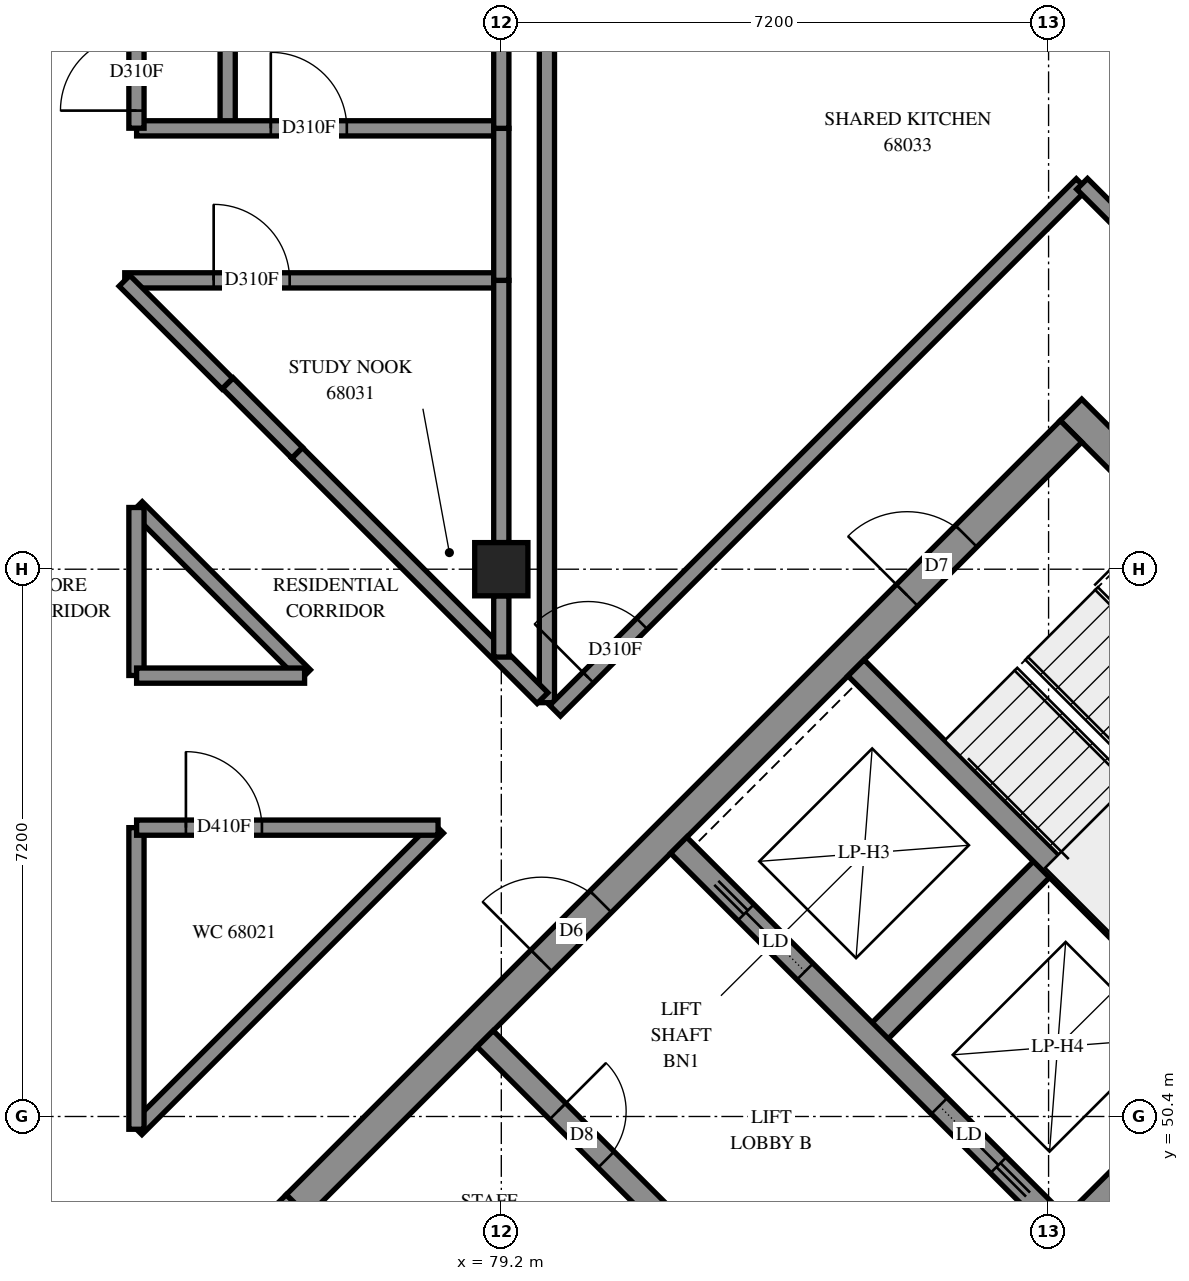
"""IFC4 building model, lengths in metres.
Left out: names, types, materials, properties, quantities, classifications, styles, units other than length and angle.
Written with IfcOpenShell. Run it as: python <this file> out.ifc"""

import sys

from ifc_helpers import new_model, si_unit, direction, frame, frame_2d, origin, origin_2d, place, context, subcontext, project, spatial, polyline, rectangle, outline, extrude, element, fill, save


model = new_model("IFC4")
c1 = context("Model", 3, precision=1e-05, world=origin(), true_north=direction((0.0, 1.0)))
c2 = subcontext(c1, "Body", "Model", "MODEL_VIEW")
j1 = project(units=[si_unit("LENGTHUNIT", "METRE"), si_unit("PLANEANGLEUNIT", "RADIAN")], contexts=[c1])
p1 = place(None, origin())
s1 = spatial("IfcSite", under=j1, at=p1, CompositionType="ELEMENT")
p2 = place(p1, origin())
s2 = spatial("IfcBuilding", under=s1, at=p2, CompositionType="ELEMENT")
p3 = place(p2, frame((0.0, 0.0, 250.6)))
s3 = spatial("IfcBuildingStorey", under=s2, at=p3, CompositionType="ELEMENT", Elevation=250.6)
p4 = place(p3, frame((79.2, 57.6, 0.0), z_axis=(0.0, 0.0, 1.0), x_axis=(1.0, 0.0, 0.0)))
e1 = element("IfcColumn", 1, at=p4, inside=s3, PredefinedType="COLUMN", context=c2, shape_type="SweptSolid", body=[
    extrude(rectangle(XDim=0.7, YDim=0.7, at=origin_2d()), origin(), (0.0, 0.0, 1.0), 3.1),
])
p5 = place(p3, frame((76.23, 49.231, -0.3), z_axis=(0.0, 0.0, 1.0), x_axis=(0.7071034917, -0.7071100706, 0.0)))
e2 = element("IfcWall", 2, at=p5, inside=s3, PredefinedType="SHEAR", context=c2, shape_type="SweptSolid", body=[
    extrude(rectangle(XDim=15.2, YDim=0.4, at=frame_2d((7.6, 0.0))), origin(), (0.0, 0.0, 1.0), 2.7),
])
p6 = place(p3, frame((86.695, 59.696, -0.3), z_axis=(0.0, 0.0, 1.0), x_axis=(0.7071100706, -0.7071034917, 0.0)))
e3 = element("IfcWall", 3, at=p6, inside=s3, PredefinedType="SHEAR", context=c2, shape_type="SweptSolid", body=[
    extrude(rectangle(XDim=15.2, YDim=0.4, at=frame_2d((7.6, 0.0))), origin(), (0.0, 0.0, 1.0), 2.7),
])
p7 = place(p6, frame((10.4, 0.0, 0.3)))
e4 = element("IfcOpeningElement", 4, at=p7, cuts=e3, PredefinedType="OPENING", context=c2, shape_type="SweptSolid", body=[
    extrude(rectangle(XDim=0.8, YDim=2.1, at=frame_2d((0.4, 1.05))), frame((0.0, 0.21, 0.0), z_axis=(0.0, -1.0, 0.0), x_axis=(1.0, 0.0, 0.0)), (0.0, 0.0, 1.0), 0.42),
])
p8 = place(p3, frame((76.513, 49.231, -0.3), z_axis=(0.0, 0.0, 1.0), x_axis=(0.7071067812, 0.7071067812, 0.0)))
e5 = element("IfcWall", 5, at=p8, inside=s3, PredefinedType="SHEAR", context=c2, shape_type="SweptSolid", body=[
    extrude(rectangle(XDim=14.4, YDim=0.4, at=frame_2d((7.2, 0.0))), origin(), (0.0, 0.0, 1.0), 2.7),
])
p9 = place(p8, frame((4.55, 0.0, 0.3)))
e6 = element("IfcOpeningElement", 6, at=p9, cuts=e5, PredefinedType="OPENING", context=c2, shape_type="SweptSolid", body=[
    extrude(rectangle(XDim=1.1, YDim=2.1, at=frame_2d((0.55, 1.05))), frame((0.0, 0.21, 0.0), z_axis=(0.0, -1.0, 0.0), x_axis=(1.0, 0.0, 0.0)), (0.0, 0.0, 1.0), 0.42),
])
p10 = place(p8, frame((11.35, 0.0, 0.3)))
e7 = element("IfcOpeningElement", 7, at=p10, cuts=e5, PredefinedType="OPENING", context=c2, shape_type="SweptSolid", body=[
    extrude(rectangle(XDim=1.1, YDim=2.1, at=frame_2d((0.55, 1.05))), frame((0.0, 0.21, 0.0), z_axis=(0.0, -1.0, 0.0), x_axis=(1.0, 0.0, 0.0)), (0.0, 0.0, 1.0), 0.42),
])
p11 = place(p3, frame((84.079, 51.423, 0.0), z_axis=(0.0, 0.0, 1.0), x_axis=(0.7071219326, 0.7070916295, 0.0)))
e8 = element("IfcWall", 8, at=p11, inside=s3, PredefinedType="SOLIDWALL", context=c2, shape_type="SweptSolid", body=[
    extrude(rectangle(XDim=3.3, YDim=0.3, at=frame_2d((1.65, 0.0))), origin(), (0.0, 0.0, 1.0), 3.1),
])
p12 = place(p3, frame((86.625, 48.878, 0.0), z_axis=(0.0, 0.0, 1.0), x_axis=(0.7071067812, 0.7071067812, 0.0)))
e9 = element("IfcWall", 9, at=p12, inside=s3, PredefinedType="SOLIDWALL", context=c2, shape_type="SweptSolid", body=[
    extrude(rectangle(XDim=3.3, YDim=0.3, at=frame_2d((1.65, 0.0))), origin(), (0.0, 0.0, 1.0), 3.1),
])
p13 = place(p3, frame((78.988, 51.423, 0.0), z_axis=(0.0, 0.0, 1.0), x_axis=(0.7071067812, -0.7071067812, 0.0)))
e10 = element("IfcWall", 10, at=p13, inside=s3, PredefinedType="SOLIDWALL", context=c2, shape_type="SweptSolid", body=[
    extrude(rectangle(XDim=14.4, YDim=0.3, at=frame_2d((7.2, 0.0))), origin(), (0.0, 0.0, 1.0), 3.1),
])
p14 = place(p13, frame((1.35, 0.0, 0.0)))
e11 = element("IfcOpeningElement", 11, at=p14, cuts=e10, PredefinedType="OPENING", context=c2, shape_type="SweptSolid", body=[
    extrude(rectangle(XDim=0.9, YDim=2.1, at=frame_2d((0.45, 1.05))), frame((0.0, 0.16, 0.0), z_axis=(0.0, -1.0, 0.0), x_axis=(1.0, 0.0, 0.0)), (0.0, 0.0, 1.0), 0.32),
])
p15 = place(p13, frame((4.95, 0.0, 0.0)))
e12 = element("IfcOpeningElement", 12, at=p15, cuts=e10, PredefinedType="OPENING", context=c2, shape_type="SweptSolid", body=[
    extrude(rectangle(XDim=0.9, YDim=2.1, at=frame_2d((0.45, 1.05))), frame((0.0, 0.16, 0.0), z_axis=(0.0, -1.0, 0.0), x_axis=(1.0, 0.0, 0.0)), (0.0, 0.0, 1.0), 0.32),
])
p16 = place(p13, frame((8.55, 0.0, 0.0)))
e13 = element("IfcOpeningElement", 13, at=p16, cuts=e10, PredefinedType="OPENING", context=c2, shape_type="SweptSolid", body=[
    extrude(rectangle(XDim=0.9, YDim=2.1, at=frame_2d((0.45, 1.05))), frame((0.0, 0.16, 0.0), z_axis=(0.0, -1.0, 0.0), x_axis=(1.0, 0.0, 0.0)), (0.0, 0.0, 1.0), 0.32),
])
p17 = place(p13, frame((12.05, 0.0, 0.0)))
e14 = element("IfcOpeningElement", 14, at=p17, cuts=e10, PredefinedType="OPENING", context=c2, shape_type="SweptSolid", body=[
    extrude(rectangle(XDim=1.1, YDim=2.1, at=frame_2d((0.55, 1.05))), frame((0.0, 0.16, 0.0), z_axis=(0.0, -1.0, 0.0), x_axis=(1.0, 0.0, 0.0)), (0.0, 0.0, 1.0), 0.32),
])
p18 = place(p3, frame((81.534, 53.969, 0.0), z_axis=(0.0, 0.0, 1.0), x_axis=(0.707103309, -0.7071102534, 0.0)))
e15 = element("IfcWall", 15, at=p18, inside=s3, PredefinedType="SOLIDWALL", context=c2, shape_type="SweptSolid", body=[
    extrude(rectangle(XDim=14.4, YDim=0.3, at=frame_2d((7.2, 0.0))), origin(), (0.0, 0.0, 1.0), 3.1),
])
p19 = place(p18, frame((8.55, 0.0, 0.0)))
e16 = element("IfcOpeningElement", 16, at=p19, cuts=e15, PredefinedType="OPENING", context=c2, shape_type="SweptSolid", body=[
    extrude(rectangle(XDim=0.9, YDim=2.1, at=frame_2d((0.45, 1.05))), frame((0.0, 0.16, 0.0), z_axis=(0.0, -1.0, 0.0), x_axis=(1.0, 0.0, 0.0)), (0.0, 0.0, 1.0), 0.32),
])
p20 = place(p18, frame((1.25, 0.0, 0.0)))
e17 = element("IfcOpeningElement", 17, at=p20, cuts=e15, PredefinedType="OPENING", context=c2, shape_type="SweptSolid", body=[
    extrude(rectangle(XDim=1.1, YDim=2.1, at=frame_2d((0.55, 1.05))), frame((0.0, 0.16, 0.0), z_axis=(0.0, -1.0, 0.0), x_axis=(1.0, 0.0, 0.0)), (0.0, 0.0, 1.0), 0.32),
])
p21 = place(p18, frame((4.85, 0.0, 0.0)))
e18 = element("IfcOpeningElement", 18, at=p21, cuts=e15, PredefinedType="OPENING", context=c2, shape_type="SweptSolid", body=[
    extrude(rectangle(XDim=1.1, YDim=2.1, at=frame_2d((0.55, 1.05))), frame((0.0, 0.16, 0.0), z_axis=(0.0, -1.0, 0.0), x_axis=(1.0, 0.0, 0.0)), (0.0, 0.0, 1.0), 0.32),
])
p22 = place(p18, frame((12.05, 0.0, 0.0)))
e19 = element("IfcOpeningElement", 19, at=p22, cuts=e15, PredefinedType="OPENING", context=c2, shape_type="SweptSolid", body=[
    extrude(rectangle(XDim=1.1, YDim=2.1, at=frame_2d((0.55, 1.05))), frame((0.0, 0.16, 0.0), z_axis=(0.0, -1.0, 0.0), x_axis=(1.0, 0.0, 0.0)), (0.0, 0.0, 1.0), 0.32),
])
p23 = place(p3, frame((83.867, 56.302, 0.0), z_axis=(0.0, 0.0, 1.0), x_axis=(0.7071137256, -0.7070998367, 0.0)))
e20 = element("IfcWall", 20, at=p23, inside=s3, PredefinedType="SOLIDWALL", context=c2, shape_type="SweptSolid", body=[
    extrude(rectangle(XDim=7.2, YDim=0.3, at=frame_2d((3.6, 0.0))), origin(), (0.0, 0.0, 1.0), 3.1),
])
p24 = place(p3, frame((88.928, 64.159, 0.0), z_axis=(0.0, 0.0, 1.0), x_axis=(-0.7792026718, 0.6267720449, 0.0)))
e21 = element("IfcWall", 21, at=p24, inside=s3, PredefinedType="SOLIDWALL", context=c2, shape_type="SweptSolid", body=[
    extrude(outline(polyline([(-0.024, -0.225), (3.325, -0.225), (3.373, 0.225), (0.024, 0.225), (-0.024, -0.225)])), origin(), (0.0, 0.0, 1.0), 3.1),
])
p25 = place(p24, frame((0.328, 0.0, 0.45)))
e22 = element("IfcOpeningElement", 22, at=p25, cuts=e21, PredefinedType="OPENING", context=c2, shape_type="SweptSolid", body=[
    extrude(rectangle(XDim=1.2, YDim=2.55, at=frame_2d((0.6, 1.275))), frame((0.0, 0.235, 0.0), z_axis=(0.0, -1.0, 0.0), x_axis=(1.0, 0.0, 0.0)), (0.0, 0.0, 1.0), 0.47),
])
p26 = place(p24, frame((1.791, 0.0, 0.45)))
e23 = element("IfcOpeningElement", 23, at=p26, cuts=e21, PredefinedType="OPENING", context=c2, shape_type="SweptSolid", body=[
    extrude(rectangle(XDim=1.2, YDim=2.55, at=frame_2d((0.6, 1.275))), frame((0.0, 0.235, 0.0), z_axis=(0.0, -1.0, 0.0), x_axis=(1.0, 0.0, 0.0)), (0.0, 0.0, 1.0), 0.47),
])
p27 = place(p3, frame((79.8, 55.844, 0.0), z_axis=(0.0, 0.0, 1.0), x_axis=(0.0, 1.0, 0.0)))
e24 = element("IfcWall", 24, at=p27, inside=s3, PredefinedType="PARTITIONING", context=c2, shape_type="SweptSolid", body=[
    extrude(rectangle(XDim=11.664, YDim=0.2, at=frame_2d((5.832, 0.0))), origin(), (0.0, 0.0, 1.0), 3.1),
])
p28 = place(p3, frame((79.907, 55.739, 0.0), z_axis=(0.0, 0.0, 1.0), x_axis=(0.7071067812, 0.7071067812, 0.0)))
e25 = element("IfcWall", 25, at=p28, inside=s3, PredefinedType="PARTITIONING", context=c2, shape_type="SweptSolid", body=[
    extrude(rectangle(XDim=9.798, YDim=0.2, at=frame_2d((4.899, 0.0))), origin(), (0.0, 0.0, 1.0), 3.1),
])
p29 = place(p28, frame((0.617, 0.0, 0.0)))
e26 = element("IfcOpeningElement", 26, at=p29, cuts=e25, PredefinedType="OPENING", context=c2, shape_type="SweptSolid", body=[
    extrude(rectangle(XDim=1.0, YDim=2.1, at=frame_2d((0.5, 1.05))), frame((0.0, 0.11, 0.0), z_axis=(0.0, -1.0, 0.0), x_axis=(1.0, 0.0, 0.0)), (0.0, 0.0, 1.0), 0.22),
])
p30 = place(p3, frame((75.6, 63.4, 0.0), z_axis=(0.0, 0.0, 1.0), x_axis=(0.0, 1.0, 0.0)))
e27 = element("IfcWall", 27, at=p30, inside=s3, PredefinedType="PARTITIONING", context=c2, shape_type="SweptSolid", body=[
    extrude(rectangle(XDim=9.412, YDim=0.2, at=frame_2d((4.706, 0.0))), origin(), (0.0, 0.0, 1.0), 3.1),
])
p31 = place(p3, frame((74.401, 50.233, 0.0), z_axis=(0.0, 0.0, 1.0), x_axis=(0.7071067812, 0.7071067812, 0.0)))
e28 = element("IfcWall", 28, at=p31, inside=s3, PredefinedType="PARTITIONING", context=c2, shape_type="SweptSolid", body=[
    extrude(rectangle(XDim=5.609, YDim=0.2, at=frame_2d((2.804, 0.0))), origin(), (0.0, 0.0, 1.0), 3.1),
])
p32 = place(p3, frame((74.246, 61.4, 0.0), z_axis=(0.0, 0.0, 1.0), x_axis=(1.0, 0.0, 0.0)))
e29 = element("IfcWall", 29, at=p32, inside=s3, PredefinedType="PARTITIONING", context=c2, shape_type="SweptSolid", body=[
    extrude(rectangle(XDim=4.954, YDim=0.2, at=frame_2d((2.477, 0.0))), origin(), (0.0, 0.0, 1.0), 3.1),
])
p33 = place(p32, frame((1.17, 0.0, 0.0)))
e30 = element("IfcOpeningElement", 30, at=p33, cuts=e29, PredefinedType="OPENING", context=c2, shape_type="SweptSolid", body=[
    extrude(rectangle(XDim=1.0, YDim=2.1, at=frame_2d((0.5, 1.05))), frame((0.0, 0.11, 0.0), z_axis=(0.0, -1.0, 0.0), x_axis=(1.0, 0.0, 0.0)), (0.0, 0.0, 1.0), 0.22),
])
p34 = place(p3, frame((74.402, 63.4, 0.0), z_axis=(0.0, 0.0, 1.0), x_axis=(1.0, 0.0, 0.0)))
e31 = element("IfcWall", 31, at=p34, inside=s3, PredefinedType="PARTITIONING", context=c2, shape_type="SweptSolid", body=[
    extrude(rectangle(XDim=4.798, YDim=0.2, at=frame_2d((2.399, 0.0))), origin(), (0.0, 0.0, 1.0), 3.1),
])
p35 = place(p34, frame((1.766, 0.0, 0.0)))
e32 = element("IfcOpeningElement", 32, at=p35, cuts=e31, PredefinedType="OPENING", context=c2, shape_type="SweptSolid", body=[
    extrude(rectangle(XDim=1.0, YDim=2.1, at=frame_2d((0.5, 1.05))), frame((0.0, 0.11, 0.0), z_axis=(0.0, -1.0, 0.0), x_axis=(1.0, 0.0, 0.0)), (0.0, 0.0, 1.0), 0.22),
])
p36 = place(p3, frame((76.513, 59.131, 0.0), z_axis=(0.0, 0.0, 1.0), x_axis=(0.7073586681, -0.7068548045, 0.0)))
e33 = element("IfcWall", 33, at=p36, inside=s3, PredefinedType="PARTITIONING", context=c2, shape_type="SweptSolid", body=[
    extrude(rectangle(XDim=4.565, YDim=0.2, at=frame_2d((2.282, 0.0))), origin(), (0.0, 0.0, 1.0), 3.1),
])
p37 = place(p3, frame((74.4, 50.232, 0.0), z_axis=(0.0, 0.0, 1.0), x_axis=(0.0, 1.0, 0.0)))
e34 = element("IfcWall", 34, at=p37, inside=s3, PredefinedType="PARTITIONING", context=c2, shape_type="SweptSolid", body=[
    extrude(rectangle(XDim=3.968, YDim=0.2, at=frame_2d((1.984, 0.0))), origin(), (0.0, 0.0, 1.0), 3.1),
])
p38 = place(p3, frame((74.402, 54.2, 0.0), z_axis=(0.0, 0.0, 1.0), x_axis=(1.0, 0.0, 0.0)))
e35 = element("IfcWall", 35, at=p38, inside=s3, PredefinedType="PARTITIONING", context=c2, shape_type="SweptSolid", body=[
    extrude(rectangle(XDim=3.966, YDim=0.2, at=frame_2d((1.983, 0.0))), origin(), (0.0, 0.0, 1.0), 3.1),
])
p39 = place(p38, frame((0.649, 0.0, 0.0)))
e36 = element("IfcOpeningElement", 36, at=p39, cuts=e35, PredefinedType="OPENING", context=c2, shape_type="SweptSolid", body=[
    extrude(rectangle(XDim=1.0, YDim=2.1, at=frame_2d((0.5, 1.05))), frame((0.0, 0.11, 0.0), z_axis=(0.0, -1.0, 0.0), x_axis=(1.0, 0.0, 0.0)), (0.0, 0.0, 1.0), 0.22),
])
p40 = place(p3, frame((74.4, 63.402, 0.0), z_axis=(0.0, 0.0, 1.0), x_axis=(0.0, 1.0, 0.0)))
e37 = element("IfcWall", 37, at=p40, inside=s3, PredefinedType="PARTITIONING", context=c2, shape_type="SweptSolid", body=[
    extrude(rectangle(XDim=3.798, YDim=0.2, at=frame_2d((1.899, 0.0))), origin(), (0.0, 0.0, 1.0), 3.1),
])
p41 = place(p40, frame((0.231, 0.0, 0.0)))
e38 = element("IfcOpeningElement", 38, at=p41, cuts=e37, PredefinedType="OPENING", context=c2, shape_type="SweptSolid", body=[
    extrude(rectangle(XDim=1.0, YDim=2.1, at=frame_2d((0.5, 1.05))), frame((0.0, 0.11, 0.0), z_axis=(0.0, -1.0, 0.0), x_axis=(1.0, 0.0, 0.0)), (0.0, 0.0, 1.0), 0.22),
])
p42 = place(p3, frame((79.2, 57.95, 0.0), z_axis=(0.0, 0.0, 1.0), x_axis=(0.0, 1.0, 0.0)))
e39 = element("IfcWall", 39, at=p42, inside=s3, PredefinedType="PARTITIONING", context=c2, shape_type="SweptSolid", body=[
    extrude(rectangle(XDim=3.45, YDim=0.2, at=frame_2d((1.725, 0.0))), origin(), (0.0, 0.0, 1.0), 3.1),
])
p43 = place(p3, frame((74.406, 58.417, 0.0), z_axis=(0.0, 0.0, 1.0), x_axis=(0.7071067812, -0.7071067812, 0.0)))
e40 = element("IfcWall", 40, at=p43, inside=s3, PredefinedType="PARTITIONING", context=c2, shape_type="SweptSolid", body=[
    extrude(rectangle(XDim=3.128, YDim=0.2, at=frame_2d((1.564, 0.0))), origin(), (0.0, 0.0, 1.0), 3.1),
])
p44 = place(p3, frame((86.841, 62.669, 0.0), z_axis=(0.0, 0.0, 1.0), x_axis=(0.7071067812, -0.7071067812, 0.0)))
e41 = element("IfcWall", 41, at=p44, inside=s3, PredefinedType="PARTITIONING", context=c2, shape_type="SweptSolid", body=[
    extrude(rectangle(XDim=2.398, YDim=0.2, at=frame_2d((1.199, 0.0))), origin(), (0.0, 0.0, 1.0), 3.1),
])
for number, where, z_axis, x_axis in (
    (42, (74.4, 56.202, 0.0), (0.0, 0.0, 1.0), (0.0, 1.0, 0.0)),
    (43, (74.402, 56.2, 0.0), (0.0, 0.0, 1.0), (1.0, 0.0, 0.0)),
):
    element("IfcWall", number, at=place(p3, frame(where, z_axis=z_axis, x_axis=x_axis)), inside=s3, PredefinedType="PARTITIONING", context=c2, shape_type="SweptSolid", body=[
        extrude(rectangle(XDim=2.21, YDim=0.2, at=frame_2d((1.105, 0.0))), origin(), (0.0, 0.0, 1.0), 3.1),
    ])
p45 = place(p3, frame((79.2, 61.4, 0.0), z_axis=(0.0, 0.0, 1.0), x_axis=(0.0, 1.0, 0.0)))
e44 = element("IfcWall", 44, at=p45, inside=s3, PredefinedType="PARTITIONING", context=c2, shape_type="SweptSolid", body=[
    extrude(rectangle(XDim=2.0, YDim=0.2, at=frame_2d((1.0, 0.0))), origin(), (0.0, 0.0, 1.0), 3.1),
])
p46 = place(p3, frame((74.243, 61.395, 0.0), z_axis=(0.0, 0.0, 1.0), x_axis=(0.7071067812, -0.7071067812, 0.0)))
e45 = element("IfcWall", 45, at=p46, inside=s3, PredefinedType="PARTITIONING", context=c2, shape_type="SweptSolid", body=[
    extrude(rectangle(XDim=1.915, YDim=0.2, at=frame_2d((0.957, 0.0))), origin(), (0.0, 0.0, 1.0), 3.1),
])
p47 = place(p3, frame((75.602, 60.046, 0.0), z_axis=(0.0, 0.0, 1.0), x_axis=(0.7063318703, -0.7078808437, 0.0)))
e46 = element("IfcWall", 46, at=p47, inside=s3, PredefinedType="PARTITIONING", context=c2, shape_type="SweptSolid", body=[
    extrude(rectangle(XDim=1.291, YDim=0.2, at=frame_2d((0.646, 0.0))), origin(), (0.0, 0.0, 1.0), 3.1),
])
p48 = place(p3, frame((79.2, 63.4, 0.0), z_axis=(0.0, 0.0, 1.0), x_axis=(0.0, 1.0, 0.0)))
e47 = element("IfcWall", 47, at=p48, inside=s3, PredefinedType="PARTITIONING", context=c2, shape_type="SweptSolid", body=[
    extrude(rectangle(XDim=1.05, YDim=0.2, at=frame_2d((0.525, 0.0))), origin(), (0.0, 0.0, 1.0), 3.1),
])
p49 = place(p3, frame((79.2, 56.444, 0.0), z_axis=(0.0, 0.0, 1.0), x_axis=(0.0, 1.0, 0.0)))
e48 = element("IfcWall", 48, at=p49, inside=s3, PredefinedType="PARTITIONING", context=c2, shape_type="SweptSolid", body=[
    extrude(rectangle(XDim=0.806, YDim=0.2, at=frame_2d((0.403, 0.0))), origin(), (0.0, 0.0, 1.0), 3.1),
])
p50 = place(p9, origin())
e49 = element("IfcDoor", 49, at=p50, inside=s3, OperationType="DOUBLE_DOOR_SINGLE_SWING", PredefinedType="DOOR", context=c2, shape_type="SweptSolid", body=[
    extrude(rectangle(XDim=1.1, YDim=2.1, at=frame_2d((0.55, 1.05))), frame((0.0, 0.025, 0.0), z_axis=(0.0, -1.0, 0.0), x_axis=(1.0, 0.0, 0.0)), (0.0, 0.0, 1.0), 0.05),
])
fill(e6, e49)
p51 = place(p10, origin())
e50 = element("IfcDoor", 50, at=p51, inside=s3, OperationType="SINGLE_SWING_LEFT", PredefinedType="DOOR", context=c2, shape_type="SweptSolid", body=[
    extrude(rectangle(XDim=1.1, YDim=2.1, at=frame_2d((0.55, 1.05))), frame((0.0, 0.025, 0.0), z_axis=(0.0, -1.0, 0.0), x_axis=(1.0, 0.0, 0.0)), (0.0, 0.0, 1.0), 0.05),
])
fill(e7, e50)
p52 = place(p14, origin())
e51 = element("IfcDoor", 51, at=p52, inside=s3, OperationType="SINGLE_SWING_LEFT", PredefinedType="DOOR", context=c2, shape_type="SweptSolid", body=[
    extrude(rectangle(XDim=0.9, YDim=2.1, at=frame_2d((0.45, 1.05))), frame((0.0, 0.025, 0.0), z_axis=(0.0, -1.0, 0.0), x_axis=(1.0, 0.0, 0.0)), (0.0, 0.0, 1.0), 0.05),
])
fill(e11, e51)
p53 = place(p20, origin())
e52 = element("IfcDoor", 52, at=p53, inside=s3, OperationType="SLIDING_TO_LEFT", PredefinedType="DOOR", context=c2, shape_type="SweptSolid", body=[
    extrude(rectangle(XDim=1.1, YDim=2.1, at=frame_2d((0.55, 1.05))), frame((0.0, 0.025, 0.0), z_axis=(0.0, -1.0, 0.0), x_axis=(1.0, 0.0, 0.0)), (0.0, 0.0, 1.0), 0.05),
])
fill(e17, e52)
p54 = place(p21, origin())
e53 = element("IfcDoor", 53, at=p54, inside=s3, OperationType="SLIDING_TO_RIGHT", PredefinedType="DOOR", context=c2, shape_type="SweptSolid", body=[
    extrude(rectangle(XDim=1.1, YDim=2.1, at=frame_2d((0.55, 1.05))), frame((0.0, 0.025, 0.0), z_axis=(0.0, -1.0, 0.0), x_axis=(1.0, 0.0, 0.0)), (0.0, 0.0, 1.0), 0.05),
])
fill(e18, e53)
p55 = place(p39, origin())
e54 = element("IfcDoor", 54, at=p55, inside=s3, OperationType="SINGLE_SWING_RIGHT", PredefinedType="DOOR", context=c2, shape_type="SweptSolid", body=[
    extrude(rectangle(XDim=1.0, YDim=2.1, at=frame_2d((0.5, 1.05))), frame((0.0, 0.025, 0.0), z_axis=(0.0, -1.0, 0.0), x_axis=(1.0, 0.0, 0.0)), (0.0, 0.0, 1.0), 0.05),
])
fill(e36, e54)
p56 = place(p41, origin())
e55 = element("IfcDoor", 55, at=p56, inside=s3, OperationType="SINGLE_SWING_RIGHT", PredefinedType="DOOR", context=c2, shape_type="SweptSolid", body=[
    extrude(rectangle(XDim=1.0, YDim=2.1, at=frame_2d((0.5, 1.05))), frame((0.0, 0.025, 0.0), z_axis=(0.0, -1.0, 0.0), x_axis=(1.0, 0.0, 0.0)), (0.0, 0.0, 1.0), 0.05),
])
fill(e38, e55)
p57 = place(p35, origin())
e56 = element("IfcDoor", 56, at=p57, inside=s3, OperationType="SINGLE_SWING_LEFT", PredefinedType="DOOR", context=c2, shape_type="SweptSolid", body=[
    extrude(rectangle(XDim=1.0, YDim=2.1, at=frame_2d((0.5, 1.05))), frame((0.0, 0.025, 0.0), z_axis=(0.0, -1.0, 0.0), x_axis=(1.0, 0.0, 0.0)), (0.0, 0.0, 1.0), 0.05),
])
fill(e32, e56)
p58 = place(p33, origin())
e57 = element("IfcDoor", 57, at=p58, inside=s3, OperationType="SINGLE_SWING_RIGHT", PredefinedType="DOOR", context=c2, shape_type="SweptSolid", body=[
    extrude(rectangle(XDim=1.0, YDim=2.1, at=frame_2d((0.5, 1.05))), frame((0.0, 0.025, 0.0), z_axis=(0.0, -1.0, 0.0), x_axis=(1.0, 0.0, 0.0)), (0.0, 0.0, 1.0), 0.05),
])
fill(e30, e57)
p59 = place(p29, origin())
e58 = element("IfcDoor", 58, at=p59, inside=s3, OperationType="SINGLE_SWING_RIGHT", PredefinedType="DOOR", context=c2, shape_type="SweptSolid", body=[
    extrude(rectangle(XDim=1.0, YDim=2.1, at=frame_2d((0.5, 1.05))), frame((0.0, 0.025, 0.0), z_axis=(0.0, -1.0, 0.0), x_axis=(1.0, 0.0, 0.0)), (0.0, 0.0, 1.0), 0.05),
])
fill(e26, e58)
save(model, sys.argv[1])
